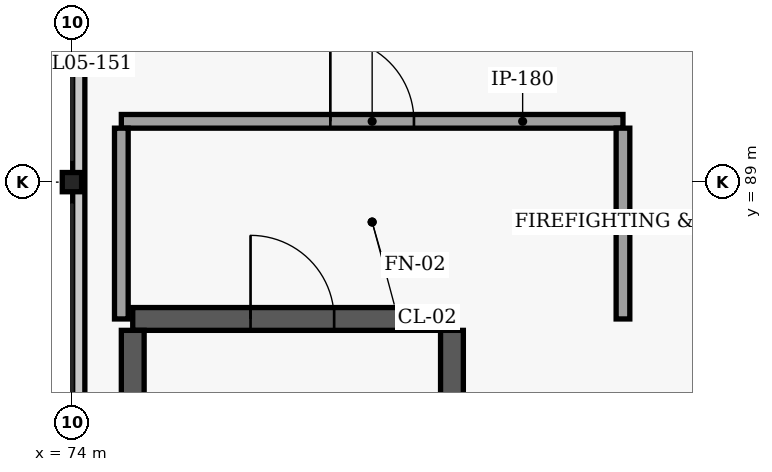
"""IFC4 building model, lengths in metres.
Left out: names, types, materials, properties, quantities, classifications, styles, units other than length and angle.
Written with IfcOpenShell. Run it as: python <this file> out.ifc"""

import sys

from ifc_helpers import new_model, si_unit, direction, frame, frame_2d, origin, origin_2d, place, context, subcontext, project, spatial, rectangle, i_section, extrude, element, fill, save


model = new_model("IFC4")
c1 = context("Model", 3, precision=1e-05, world=origin(), true_north=direction((0.0, 1.0)))
c2 = subcontext(c1, "Body", "Model", "MODEL_VIEW")
j1 = project(units=[si_unit("LENGTHUNIT", "METRE"), si_unit("PLANEANGLEUNIT", "RADIAN")], contexts=[c1])
p1 = place(None, origin())
s1 = spatial("IfcSite", under=j1, at=p1, CompositionType="ELEMENT")
p2 = place(p1, origin())
s2 = spatial("IfcBuilding", under=s1, at=p2, CompositionType="ELEMENT")
p3 = place(p2, frame((0.0, 0.0, 18.6)))
s3 = spatial("IfcBuildingStorey", under=s2, at=p3, CompositionType="ELEMENT", Elevation=18.6)
p4 = place(p3, frame((74.0, 89.0, 0.0), z_axis=(0.0, 0.0, 1.0), x_axis=(1.0, 0.0, 0.0)))
e1 = element("IfcColumn", 1, at=p4, inside=s3, PredefinedType="COLUMN", context=c2, shape_type="SweptSolid", body=[
    extrude(i_section(OverallWidth=0.254, OverallDepth=0.253, WebThickness=0.009, FlangeThickness=0.014, FilletRadius=0.012, at=origin_2d()), origin(), (0.0, 0.0, 1.0), 3.96),
])
p5 = place(p3, frame((74.8, 87.2, 0.0), z_axis=(0.0, 0.0, 1.0), x_axis=(1.0, 0.0, 0.0)))
e2 = element("IfcWall", 2, at=p5, inside=s3, PredefinedType="SHEAR", context=c2, shape_type="SweptSolid", body=[
    extrude(rectangle(XDim=4.2, YDim=0.3, at=frame_2d((2.1, 0.0))), origin(), (0.0, 0.0, 1.0), 5.1),
])
p6 = place(p5, frame((1.55, 0.0, 0.0)))
e3 = element("IfcOpeningElement", 3, at=p6, cuts=e2, PredefinedType="OPENING", context=c2, shape_type="SweptSolid", body=[
    extrude(rectangle(XDim=1.1, YDim=2.2, at=frame_2d((0.55, 1.1))), frame((0.0, 0.16, 0.0), z_axis=(0.0, -1.0, 0.0), x_axis=(1.0, 0.0, 0.0)), (0.0, 0.0, 1.0), 0.32),
])
for number, where, z_axis, x_axis in (
    (4, (74.8, 78.35, 0.0), (0.0, 0.0, 1.0), (0.0, 1.0, 0.0)),
    (5, (79.0, 78.35, 0.0), (0.0, 0.0, 1.0), (0.0, 1.0, 0.0)),
):
    element("IfcWall", number, at=place(p3, frame(where, z_axis=z_axis, x_axis=x_axis)), inside=s3, PredefinedType="SHEAR", context=c2, shape_type="SweptSolid", body=[
        extrude(rectangle(XDim=8.7, YDim=0.3, at=frame_2d((4.35, 0.0))), origin(), (0.0, 0.0, 1.0), 5.1),
    ])
p7 = place(p3, frame((74.09, 105.91, 4.2), z_axis=(0.0, 0.0, 1.0), x_axis=(0.0, -1.0, 0.0)))
e6 = element("IfcWall", 6, at=p7, inside=s3, PredefinedType="PARAPET", context=c2, shape_type="SweptSolid", body=[
    extrude(rectangle(XDim=27.82, YDim=0.16, at=frame_2d((13.91, 0.0))), origin(), (0.0, 0.0, 1.0), 1.2),
])
p8 = place(p3, frame((74.65, 89.8, 0.0), z_axis=(0.0, 0.0, 1.0), x_axis=(1.0, 0.0, 0.0)))
e7 = element("IfcWall", 7, at=p8, inside=s3, PredefinedType="SOLIDWALL", context=c2, shape_type="SweptSolid", body=[
    extrude(rectangle(XDim=6.6, YDim=0.18, at=frame_2d((3.3, 0.0))), origin(), (0.0, 0.0, 1.0), 3.9),
])
p9 = place(p8, frame((2.75, 0.0, 0.0)))
e8 = element("IfcOpeningElement", 8, at=p9, cuts=e7, PredefinedType="OPENING", context=c2, shape_type="SweptSolid", body=[
    extrude(rectangle(XDim=1.1, YDim=2.2, at=frame_2d((0.55, 1.1))), frame((0.0, 0.1, 0.0), z_axis=(0.0, -1.0, 0.0), x_axis=(1.0, 0.0, 0.0)), (0.0, 0.0, 1.0), 0.2),
])
for number, where, z_axis, x_axis in (
    (9, (74.65, 87.2, 0.0), (0.0, 0.0, 1.0), (0.0, 1.0, 0.0)),
    (10, (81.25, 87.2, 0.0), (0.0, 0.0, 1.0), (0.0, 1.0, 0.0)),
):
    element("IfcWall", number, at=place(p3, frame(where, z_axis=z_axis, x_axis=x_axis)), inside=s3, PredefinedType="SOLIDWALL", context=c2, shape_type="SweptSolid", body=[
        extrude(rectangle(XDim=2.51, YDim=0.18, at=frame_2d((1.255, 0.0))), origin(), (0.0, 0.0, 1.0), 3.55),
    ])
p10 = place(p6, origin())
e11 = element("IfcDoor", 11, at=p10, inside=s3, OperationType="SINGLE_SWING_LEFT", PredefinedType="DOOR", context=c2, shape_type="SweptSolid", body=[
    extrude(rectangle(XDim=1.1, YDim=2.2, at=frame_2d((0.55, 1.1))), frame((0.0, 0.025, 0.0), z_axis=(0.0, -1.0, 0.0), x_axis=(1.0, 0.0, 0.0)), (0.0, 0.0, 1.0), 0.05),
])
fill(e3, e11)
p11 = place(p9, origin())
e12 = element("IfcDoor", 12, at=p11, inside=s3, OperationType="SINGLE_SWING_LEFT", PredefinedType="DOOR", context=c2, shape_type="SweptSolid", body=[
    extrude(rectangle(XDim=1.1, YDim=2.2, at=frame_2d((0.55, 1.1))), frame((0.0, 0.025, 0.0), z_axis=(0.0, -1.0, 0.0), x_axis=(1.0, 0.0, 0.0)), (0.0, 0.0, 1.0), 0.05),
])
fill(e8, e12)
save(model, sys.argv[1])
